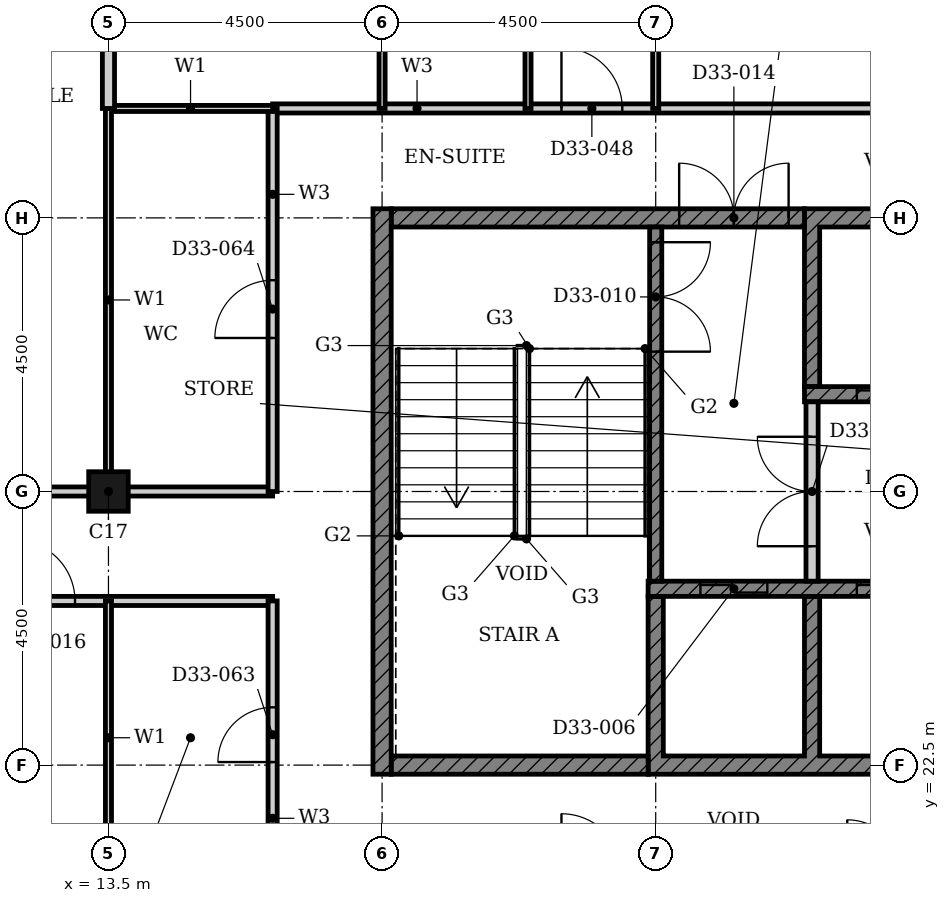
"""IFC4 building model, lengths in metres.
Left out: names, types, materials, properties, quantities, classifications, styles, units other than length and angle.
Written with IfcOpenShell. Run it as: python <this file> out.ifc"""

import sys

from ifc_helpers import new_model, si_unit, direction, frame, frame_2d, origin, origin_2d, place, context, subcontext, project, spatial, polyline, rectangle, hollow_rectangle, outline, extrude, element, fill, save


model = new_model("IFC4")
c1 = context("Model", 3, precision=1e-05, world=origin(), true_north=direction((0.0, 1.0)))
c2 = subcontext(c1, "Body", "Model", "MODEL_VIEW")
j1 = project(units=[si_unit("LENGTHUNIT", "METRE"), si_unit("PLANEANGLEUNIT", "RADIAN")], contexts=[c1])
p1 = place(None, origin())
s1 = spatial("IfcSite", under=j1, at=p1, CompositionType="ELEMENT")
p2 = place(p1, origin())
s2 = spatial("IfcBuilding", under=s1, at=p2, CompositionType="ELEMENT")
p3 = place(p2, frame((0.0, 0.0, 133.2)))
s3 = spatial("IfcBuildingStorey", under=s2, at=p3, CompositionType="ELEMENT", Elevation=133.2)
p4 = place(p3, frame((13.5, 27.0, 0.0), z_axis=(0.0, 0.0, 1.0), x_axis=(1.0, 0.0, 0.0)))
e1 = element("IfcColumn", 1, at=p4, inside=s3, PredefinedType="COLUMN", context=c2, shape_type="SweptSolid", body=[
    extrude(hollow_rectangle(XDim=0.65, YDim=0.65, WallThickness=0.021, at=origin_2d()), origin(), (0.0, 0.0, 1.0), 3.6),
])
p5 = place(p3, origin())
e2 = element("IfcWall", 2, at=p5, inside=s3, PredefinedType="SHEAR", context=c2, shape_type="SweptSolid", body=[
    extrude(outline(polyline([(22.375, 22.35), (38.053, 22.35), (38.053, 25.275), (37.803, 25.275), (37.803, 22.65), (35.482, 22.65), (35.482, 25.275), (35.232, 25.275), (35.232, 22.65), (32.911, 22.65), (32.911, 25.275), (32.661, 25.275), (32.661, 22.65), (30.339, 22.65), (30.339, 25.275), (30.089, 25.275), (30.089, 22.65), (27.768, 22.65), (27.768, 25.275), (27.518, 25.275), (27.518, 22.65), (25.197, 22.65), (25.197, 25.275), (24.947, 25.275), (24.947, 22.65), (22.625, 22.65), (22.625, 25.275), (22.375, 25.275), (22.375, 22.35)])), origin(), (0.0, 0.0, 1.0), 3.3),
])
p6 = place(p3, origin())
e3 = element("IfcWall", 3, at=p6, inside=s3, PredefinedType="SHEAR", context=c2, shape_type="SweptSolid", body=[
    extrude(outline(polyline([(24.947, 28.725), (25.197, 28.725), (25.197, 31.35), (27.518, 31.35), (27.518, 28.725), (27.768, 28.725), (27.768, 31.35), (30.089, 31.35), (30.089, 28.725), (30.339, 28.725), (30.339, 31.35), (32.661, 31.35), (32.661, 28.725), (32.911, 28.725), (32.911, 31.35), (35.232, 31.35), (35.232, 28.725), (35.482, 28.725), (35.482, 31.35), (37.803, 31.35), (37.803, 28.725), (38.053, 28.725), (38.053, 31.35), (40.375, 31.35), (40.375, 28.725), (40.625, 28.725), (40.625, 31.65), (24.947, 31.65), (24.947, 28.725)])), origin(), (0.0, 0.0, 1.0), 3.3),
])
p7 = place(p3, frame((18.15, 22.5, 0.0), z_axis=(0.0, 0.0, 1.0), x_axis=(1.0, 0.0, 0.0)))
e4 = element("IfcWall", 4, at=p7, inside=s3, PredefinedType="SHEAR", context=c2, shape_type="SweptSolid", body=[
    extrude(rectangle(XDim=4.225, YDim=0.3, at=frame_2d((2.113, 0.0))), origin(), (0.0, 0.0, 1.0), 3.3),
])
p8 = place(p3, frame((18.15, 31.5, 0.0), z_axis=(0.0, 0.0, 1.0), x_axis=(1.0, 0.0, 0.0)))
e5 = element("IfcWall", 5, at=p8, inside=s3, PredefinedType="SHEAR", context=c2, shape_type="SweptSolid", body=[
    extrude(rectangle(XDim=6.797, YDim=0.3, at=frame_2d((3.398, 0.0))), origin(), (0.0, 0.0, 1.0), 3.3),
])
p9 = place(p8, frame((4.736, 0.0, 0.0)))
e6 = element("IfcOpeningElement", 6, at=p9, cuts=e5, PredefinedType="OPENING", context=c2, shape_type="SweptSolid", body=[
    extrude(rectangle(XDim=1.8, YDim=2.1, at=frame_2d((0.9, 1.05))), frame((0.0, 0.16, 0.0), z_axis=(0.0, -1.0, 0.0), x_axis=(1.0, 0.0, 0.0)), (0.0, 0.0, 1.0), 0.32),
])
p10 = place(p3, frame((18.0, 22.35, 0.0), z_axis=(0.0, 0.0, 1.0), x_axis=(0.0, 1.0, 0.0)))
e7 = element("IfcWall", 7, at=p10, inside=s3, PredefinedType="SHEAR", context=c2, shape_type="SweptSolid", body=[
    extrude(rectangle(XDim=9.3, YDim=0.3, at=frame_2d((4.65, 0.0))), origin(), (0.0, 0.0, 1.0), 3.3),
])
p11 = place(p3, frame((22.375, 25.4, 0.0), z_axis=(0.0, 0.0, 1.0), x_axis=(1.0, 0.0, 0.0)))
e8 = element("IfcWall", 8, at=p11, inside=s3, PredefinedType="SHEAR", context=c2, shape_type="SweptSolid", body=[
    extrude(rectangle(XDim=15.678, YDim=0.25, at=frame_2d((7.839, 0.0))), origin(), (0.0, 0.0, 1.0), 3.3),
])
p12 = place(p11, frame((3.432, 0.0, 0.0)))
e9 = element("IfcOpeningElement", 9, at=p12, cuts=e8, PredefinedType="OPENING", context=c2, shape_type="SweptSolid", body=[
    extrude(rectangle(XDim=1.1, YDim=2.1, at=frame_2d((0.55, 1.05))), frame((0.0, 0.135, 0.0), z_axis=(0.0, -1.0, 0.0), x_axis=(1.0, 0.0, 0.0)), (0.0, 0.0, 1.0), 0.27),
])
p13 = place(p11, frame((11.146, 0.0, 0.0)))
e10 = element("IfcOpeningElement", 10, at=p13, cuts=e8, PredefinedType="OPENING", context=c2, shape_type="SweptSolid", body=[
    extrude(rectangle(XDim=1.1, YDim=2.1, at=frame_2d((0.55, 1.05))), frame((0.0, 0.135, 0.0), z_axis=(0.0, -1.0, 0.0), x_axis=(1.0, 0.0, 0.0)), (0.0, 0.0, 1.0), 0.27),
])
p14 = place(p11, frame((13.718, 0.0, 0.0)))
e11 = element("IfcOpeningElement", 11, at=p14, cuts=e8, PredefinedType="OPENING", context=c2, shape_type="SweptSolid", body=[
    extrude(rectangle(XDim=1.1, YDim=2.1, at=frame_2d((0.55, 1.05))), frame((0.0, 0.135, 0.0), z_axis=(0.0, -1.0, 0.0), x_axis=(1.0, 0.0, 0.0)), (0.0, 0.0, 1.0), 0.27),
])
p15 = place(p11, frame((0.861, 0.0, 0.0)))
e12 = element("IfcOpeningElement", 12, at=p15, cuts=e8, PredefinedType="OPENING", context=c2, shape_type="SweptSolid", body=[
    extrude(rectangle(XDim=1.1, YDim=2.1, at=frame_2d((0.55, 1.05))), frame((0.0, 0.135, 0.0), z_axis=(0.0, -1.0, 0.0), x_axis=(1.0, 0.0, 0.0)), (0.0, 0.0, 1.0), 0.27),
])
p16 = place(p3, frame((24.947, 28.6, 0.0), z_axis=(0.0, 0.0, 1.0), x_axis=(1.0, 0.0, 0.0)))
e13 = element("IfcWall", 13, at=p16, inside=s3, PredefinedType="SHEAR", context=c2, shape_type="SweptSolid", body=[
    extrude(rectangle(XDim=15.678, YDim=0.25, at=frame_2d((7.839, 0.0))), origin(), (0.0, 0.0, 1.0), 3.3),
])
p17 = place(p16, frame((0.861, 0.0, 0.0)))
e14 = element("IfcOpeningElement", 14, at=p17, cuts=e13, PredefinedType="OPENING", context=c2, shape_type="SweptSolid", body=[
    extrude(rectangle(XDim=1.1, YDim=2.1, at=frame_2d((0.55, 1.05))), frame((0.0, 0.135, 0.0), z_axis=(0.0, -1.0, 0.0), x_axis=(1.0, 0.0, 0.0)), (0.0, 0.0, 1.0), 0.27),
])
p18 = place(p16, frame((8.575, 0.0, 0.0)))
e15 = element("IfcOpeningElement", 15, at=p18, cuts=e13, PredefinedType="OPENING", context=c2, shape_type="SweptSolid", body=[
    extrude(rectangle(XDim=1.1, YDim=2.1, at=frame_2d((0.55, 1.05))), frame((0.0, 0.135, 0.0), z_axis=(0.0, -1.0, 0.0), x_axis=(1.0, 0.0, 0.0)), (0.0, 0.0, 1.0), 0.27),
])
p19 = place(p16, frame((13.718, 0.0, 0.0)))
e16 = element("IfcOpeningElement", 16, at=p19, cuts=e13, PredefinedType="OPENING", context=c2, shape_type="SweptSolid", body=[
    extrude(rectangle(XDim=1.1, YDim=2.1, at=frame_2d((0.55, 1.05))), frame((0.0, 0.135, 0.0), z_axis=(0.0, -1.0, 0.0), x_axis=(1.0, 0.0, 0.0)), (0.0, 0.0, 1.0), 0.27),
])
p20 = place(p3, frame((22.5, 31.35, 0.0), z_axis=(0.0, 0.0, 1.0), x_axis=(0.0, -1.0, 0.0)))
e17 = element("IfcWall", 17, at=p20, inside=s3, PredefinedType="SHEAR", context=c2, shape_type="SweptSolid", body=[
    extrude(rectangle(XDim=5.825, YDim=0.2, at=frame_2d((2.913, 0.0))), origin(), (0.0, 0.0, 1.0), 3.3),
])
p21 = place(p20, frame((0.25, 0.0, 0.0)))
e18 = element("IfcOpeningElement", 18, at=p21, cuts=e17, PredefinedType="OPENING", context=c2, shape_type="SweptSolid", body=[
    extrude(rectangle(XDim=1.8, YDim=2.1, at=frame_2d((0.9, 1.05))), frame((0.0, 0.11, 0.0), z_axis=(0.0, -1.0, 0.0), x_axis=(1.0, 0.0, 0.0)), (0.0, 0.0, 1.0), 0.22),
])
p22 = place(p3, frame((25.072, 25.525, 0.0), z_axis=(0.0, 0.0, 1.0), x_axis=(0.0, 1.0, 0.0)))
e19 = element("IfcWall", 19, at=p22, inside=s3, PredefinedType="PARTITIONING", context=c2, shape_type="SweptSolid", body=[
    extrude(rectangle(XDim=2.95, YDim=0.2, at=frame_2d((1.475, 0.0))), origin(), (0.0, 0.0, 1.0), 3.3),
])
p23 = place(p22, frame((0.575, 0.0, 0.0)))
e20 = element("IfcOpeningElement", 20, at=p23, cuts=e19, PredefinedType="OPENING", context=c2, shape_type="SweptSolid", body=[
    extrude(rectangle(XDim=1.8, YDim=2.1, at=frame_2d((0.9, 1.05))), frame((0.0, 0.11, 0.0), z_axis=(0.0, -1.0, 0.0), x_axis=(1.0, 0.0, 0.0)), (0.0, 0.0, 1.0), 0.22),
])
p24 = place(p3, frame((4.5, 25.2, 0.0), z_axis=(0.0, 0.0, 1.0), x_axis=(1.0, 0.0, 0.0)))
e21 = element("IfcWall", 21, at=p24, inside=s3, PredefinedType="PARTITIONING", context=c2, shape_type="SweptSolid", body=[
    extrude(rectangle(XDim=11.7, YDim=0.15, at=frame_2d((5.85, 0.0))), origin(), (0.0, 0.0, 1.0), 3.3),
])
p25 = place(p24, frame((7.45, 0.0, 0.0)))
e22 = element("IfcOpeningElement", 22, at=p25, cuts=e21, PredefinedType="OPENING", context=c2, shape_type="SweptSolid", body=[
    extrude(rectangle(XDim=1.0, YDim=2.1, at=frame_2d((0.5, 1.05))), frame((0.0, 0.085, 0.0), z_axis=(0.0, -1.0, 0.0), x_axis=(1.0, 0.0, 0.0)), (0.0, 0.0, 1.0), 0.17),
])
p26 = place(p24, frame((2.95, 0.0, 0.0)))
e23 = element("IfcOpeningElement", 23, at=p26, cuts=e21, PredefinedType="OPENING", context=c2, shape_type="SweptSolid", body=[
    extrude(rectangle(XDim=1.0, YDim=2.1, at=frame_2d((0.5, 1.05))), frame((0.0, 0.085, 0.0), z_axis=(0.0, -1.0, 0.0), x_axis=(1.0, 0.0, 0.0)), (0.0, 0.0, 1.0), 0.17),
])
p27 = place(p3, frame((4.5, 27.0, 0.0), z_axis=(0.0, 0.0, 1.0), x_axis=(1.0, 0.0, 0.0)))
e24 = element("IfcWall", 24, at=p27, inside=s3, PredefinedType="PARTITIONING", context=c2, shape_type="SweptSolid", body=[
    extrude(rectangle(XDim=11.7, YDim=0.15, at=frame_2d((5.85, 0.0))), origin(), (0.0, 0.0, 1.0), 2.58),
])
p28 = place(p27, frame((6.25, 0.0, 0.0)))
e25 = element("IfcOpeningElement", 25, at=p28, cuts=e24, PredefinedType="OPENING", context=c2, shape_type="SweptSolid", body=[
    extrude(rectangle(XDim=1.0, YDim=2.1, at=frame_2d((0.5, 1.05))), frame((0.0, 0.085, 0.0), z_axis=(0.0, -1.0, 0.0), x_axis=(1.0, 0.0, 0.0)), (0.0, 0.0, 1.0), 0.17),
])
p29 = place(p3, frame((16.2, 33.3, 0.0), z_axis=(0.0, 0.0, 1.0), x_axis=(1.0, 0.0, 0.0)))
e26 = element("IfcWall", 26, at=p29, inside=s3, PredefinedType="PARTITIONING", context=c2, shape_type="SweptSolid", body=[
    extrude(rectangle(XDim=15.3, YDim=0.15, at=frame_2d((7.65, 0.0))), origin(), (0.0, 0.0, 1.0), 3.3),
])
p30 = place(p29, frame((4.75, 0.0, 0.0)))
e27 = element("IfcOpeningElement", 27, at=p30, cuts=e26, PredefinedType="OPENING", context=c2, shape_type="SweptSolid", body=[
    extrude(rectangle(XDim=1.0, YDim=2.1, at=frame_2d((0.5, 1.05))), frame((0.0, 0.085, 0.0), z_axis=(0.0, -1.0, 0.0), x_axis=(1.0, 0.0, 0.0)), (0.0, 0.0, 1.0), 0.17),
])
p31 = place(p29, frame((10.35, 0.0, 0.0)))
e28 = element("IfcOpeningElement", 28, at=p31, cuts=e26, PredefinedType="OPENING", context=c2, shape_type="SweptSolid", body=[
    extrude(rectangle(XDim=0.9, YDim=2.1, at=frame_2d((0.45, 1.05))), frame((0.0, 0.085, 0.0), z_axis=(0.0, -1.0, 0.0), x_axis=(1.0, 0.0, 0.0)), (0.0, 0.0, 1.0), 0.17),
])
p32 = place(p3, frame((16.2, 27.0, 0.0), z_axis=(0.0, 0.0, 1.0), x_axis=(0.0, 1.0, 0.0)))
e29 = element("IfcWall", 29, at=p32, inside=s3, PredefinedType="PARTITIONING", context=c2, shape_type="SweptSolid", body=[
    extrude(rectangle(XDim=6.3, YDim=0.15, at=frame_2d((3.15, 0.0))), origin(), (0.0, 0.0, 1.0), 3.3),
])
p33 = place(p32, frame((2.525, 0.0, 0.0)))
e30 = element("IfcOpeningElement", 30, at=p33, cuts=e29, PredefinedType="OPENING", context=c2, shape_type="SweptSolid", body=[
    extrude(rectangle(XDim=0.95, YDim=2.1, at=frame_2d((0.475, 1.05))), frame((0.0, 0.085, 0.0), z_axis=(0.0, -1.0, 0.0), x_axis=(1.0, 0.0, 0.0)), (0.0, 0.0, 1.0), 0.17),
])
p34 = place(p3, frame((16.2, 20.7, 0.0), z_axis=(0.0, 0.0, 1.0), x_axis=(0.0, 1.0, 0.0)))
e31 = element("IfcWall", 31, at=p34, inside=s3, PredefinedType="PARTITIONING", context=c2, shape_type="SweptSolid", body=[
    extrude(rectangle(XDim=4.5, YDim=0.15, at=frame_2d((2.25, 0.0))), origin(), (0.0, 0.0, 1.0), 3.3),
])
p35 = place(p34, frame((1.85, 0.0, 0.0)))
e32 = element("IfcOpeningElement", 32, at=p35, cuts=e31, PredefinedType="OPENING", context=c2, shape_type="SweptSolid", body=[
    extrude(rectangle(XDim=0.9, YDim=2.1, at=frame_2d((0.45, 1.05))), frame((0.0, 0.085, 0.0), z_axis=(0.0, -1.0, 0.0), x_axis=(1.0, 0.0, 0.0)), (0.0, 0.0, 1.0), 0.17),
])
p36 = place(p3, frame((13.5, 33.3, 0.0), z_axis=(0.0, 0.0, 1.0), x_axis=(1.0, 0.0, 0.0)))
e33 = element("IfcWall", 33, at=p36, inside=s3, PredefinedType="PARTITIONING", context=c2, shape_type="SweptSolid", body=[
    extrude(rectangle(XDim=2.7, YDim=0.1, at=frame_2d((1.35, 0.0))), origin(), (0.0, 0.0, 1.0), 3.3),
])
p37 = place(p3, frame((13.5, 20.7, 0.0), z_axis=(0.0, 0.0, 1.0), x_axis=(0.0, 1.0, 0.0)))
e34 = element("IfcWall", 34, at=p37, inside=s3, PredefinedType="PARTITIONING", context=c2, shape_type="SweptSolid", body=[
    extrude(rectangle(XDim=4.5, YDim=0.1, at=frame_2d((2.25, 0.0))), origin(), (0.0, 0.0, 1.0), 2.38),
])
p38 = place(p3, frame((13.5, 27.0, 0.0), z_axis=(0.0, 0.0, 1.0), x_axis=(0.0, 1.0, 0.0)))
e35 = element("IfcWall", 35, at=p38, inside=s3, PredefinedType="PARTITIONING", context=c2, shape_type="SweptSolid", body=[
    extrude(rectangle(XDim=6.3, YDim=0.1, at=frame_2d((3.15, 0.0))), origin(), (0.0, 0.0, 1.0), 2.38),
])
p39 = place(p3, frame((22.5, 33.3, 0.0), z_axis=(0.0, 0.0, 1.0), x_axis=(0.0, 1.0, 0.0)))
e36 = element("IfcWall", 36, at=p39, inside=s3, PredefinedType="PARTITIONING", context=c2, shape_type="SweptSolid", body=[
    extrude(rectangle(XDim=7.39, YDim=0.1, at=frame_2d((3.695, 0.0))), origin(), (0.0, 0.0, 1.0), 3.3),
])
p40 = place(p3, frame((13.5, 33.3, 0.0), z_axis=(0.0, 0.0, 1.0), x_axis=(0.0, 1.0, 0.0)))
e37 = element("IfcWall", 37, at=p40, inside=s3, PredefinedType="PARTITIONING", context=c2, shape_type="SweptSolid", body=[
    extrude(rectangle(XDim=2.89, YDim=0.2, at=frame_2d((1.445, 0.0))), origin(), (0.0, 0.0, 1.0), 2.38),
])
for number, where, z_axis, x_axis in (
    (38, (18.0, 33.3, 0.0), (0.0, 0.0, 1.0), (0.0, 1.0, 0.0)),
    (39, (20.4, 33.3, 0.0), (0.0, 0.0, 1.0), (0.0, 1.0, 0.0)),
):
    element("IfcWall", number, at=place(p3, frame(where, z_axis=z_axis, x_axis=x_axis)), inside=s3, PredefinedType="PARTITIONING", context=c2, shape_type="SweptSolid", body=[
        extrude(rectangle(XDim=2.7, YDim=0.1, at=frame_2d((1.35, 0.0))), origin(), (0.0, 0.0, 1.0), 3.3),
    ])
p41 = place(p12, origin())
e40 = element("IfcDoor", 40, at=p41, inside=s3, OperationType="DOUBLE_DOOR_SLIDING", PredefinedType="DOOR", context=c2, shape_type="SweptSolid", body=[
    extrude(rectangle(XDim=1.1, YDim=2.1, at=frame_2d((0.55, 1.05))), frame((0.0, 0.025, 0.0), z_axis=(0.0, -1.0, 0.0), x_axis=(1.0, 0.0, 0.0)), (0.0, 0.0, 1.0), 0.05),
])
fill(e9, e40)
p42 = place(p17, origin())
e41 = element("IfcDoor", 41, at=p42, inside=s3, OperationType="DOUBLE_DOOR_SLIDING", PredefinedType="DOOR", context=c2, shape_type="SweptSolid", body=[
    extrude(rectangle(XDim=1.1, YDim=2.1, at=frame_2d((0.55, 1.05))), frame((0.0, 0.025, 0.0), z_axis=(0.0, -1.0, 0.0), x_axis=(1.0, 0.0, 0.0)), (0.0, 0.0, 1.0), 0.05),
])
fill(e14, e41)
p43 = place(p15, origin())
e42 = element("IfcDoor", 42, at=p43, inside=s3, OperationType="DOUBLE_DOOR_SLIDING", PredefinedType="DOOR", context=c2, shape_type="SweptSolid", body=[
    extrude(rectangle(XDim=1.1, YDim=2.1, at=frame_2d((0.55, 1.05))), frame((0.0, 0.025, 0.0), z_axis=(0.0, -1.0, 0.0), x_axis=(1.0, 0.0, 0.0)), (0.0, 0.0, 1.0), 0.05),
])
fill(e12, e42)
p44 = place(p21, origin())
e43 = element("IfcDoor", 43, at=p44, inside=s3, OperationType="DOUBLE_DOOR_SINGLE_SWING", PredefinedType="DOOR", context=c2, shape_type="SweptSolid", body=[
    extrude(rectangle(XDim=1.8, YDim=2.1, at=frame_2d((0.9, 1.05))), frame((0.0, 0.025, 0.0), z_axis=(0.0, -1.0, 0.0), x_axis=(1.0, 0.0, 0.0)), (0.0, 0.0, 1.0), 0.05),
])
fill(e18, e43)
p45 = place(p23, origin())
e44 = element("IfcDoor", 44, at=p45, inside=s3, OperationType="DOUBLE_DOOR_SINGLE_SWING", PredefinedType="DOOR", context=c2, shape_type="SweptSolid", body=[
    extrude(rectangle(XDim=1.8, YDim=2.1, at=frame_2d((0.9, 1.05))), frame((0.0, 0.025, 0.0), z_axis=(0.0, -1.0, 0.0), x_axis=(1.0, 0.0, 0.0)), (0.0, 0.0, 1.0), 0.05),
])
fill(e20, e44)
p46 = place(p9, origin())
e45 = element("IfcDoor", 45, at=p46, inside=s3, OperationType="DOUBLE_DOOR_SINGLE_SWING", PredefinedType="DOOR", context=c2, shape_type="SweptSolid", body=[
    extrude(rectangle(XDim=1.8, YDim=2.1, at=frame_2d((0.9, 1.05))), frame((0.0, 0.025, 0.0), z_axis=(0.0, -1.0, 0.0), x_axis=(1.0, 0.0, 0.0)), (0.0, 0.0, 1.0), 0.05),
])
fill(e6, e45)
p47 = place(p25, origin())
e46 = element("IfcDoor", 46, at=p47, inside=s3, OperationType="SINGLE_SWING_RIGHT", PredefinedType="DOOR", context=c2, shape_type="SweptSolid", body=[
    extrude(rectangle(XDim=1.0, YDim=2.1, at=frame_2d((0.5, 1.05))), frame((0.0, 0.025, 0.0), z_axis=(0.0, -1.0, 0.0), x_axis=(1.0, 0.0, 0.0)), (0.0, 0.0, 1.0), 0.05),
])
fill(e22, e46)
p48 = place(p30, origin())
e47 = element("IfcDoor", 47, at=p48, inside=s3, OperationType="SINGLE_SWING_RIGHT", PredefinedType="DOOR", context=c2, shape_type="SweptSolid", body=[
    extrude(rectangle(XDim=1.0, YDim=2.1, at=frame_2d((0.5, 1.05))), frame((0.0, 0.025, 0.0), z_axis=(0.0, -1.0, 0.0), x_axis=(1.0, 0.0, 0.0)), (0.0, 0.0, 1.0), 0.05),
])
fill(e27, e47)
p49 = place(p35, origin())
e48 = element("IfcDoor", 48, at=p49, inside=s3, OperationType="SINGLE_SWING_RIGHT", PredefinedType="DOOR", context=c2, shape_type="SweptSolid", body=[
    extrude(rectangle(XDim=0.9, YDim=2.1, at=frame_2d((0.45, 1.05))), frame((0.0, 0.025, 0.0), z_axis=(0.0, -1.0, 0.0), x_axis=(1.0, 0.0, 0.0)), (0.0, 0.0, 1.0), 0.05),
])
fill(e32, e48)
p50 = place(p33, origin())
e49 = element("IfcDoor", 49, at=p50, inside=s3, OperationType="SINGLE_SWING_LEFT", PredefinedType="DOOR", context=c2, shape_type="SweptSolid", body=[
    extrude(rectangle(XDim=0.95, YDim=2.1, at=frame_2d((0.475, 1.05))), frame((0.0, 0.025, 0.0), z_axis=(0.0, -1.0, 0.0), x_axis=(1.0, 0.0, 0.0)), (0.0, 0.0, 1.0), 0.05),
])
fill(e30, e49)
save(model, sys.argv[1])
